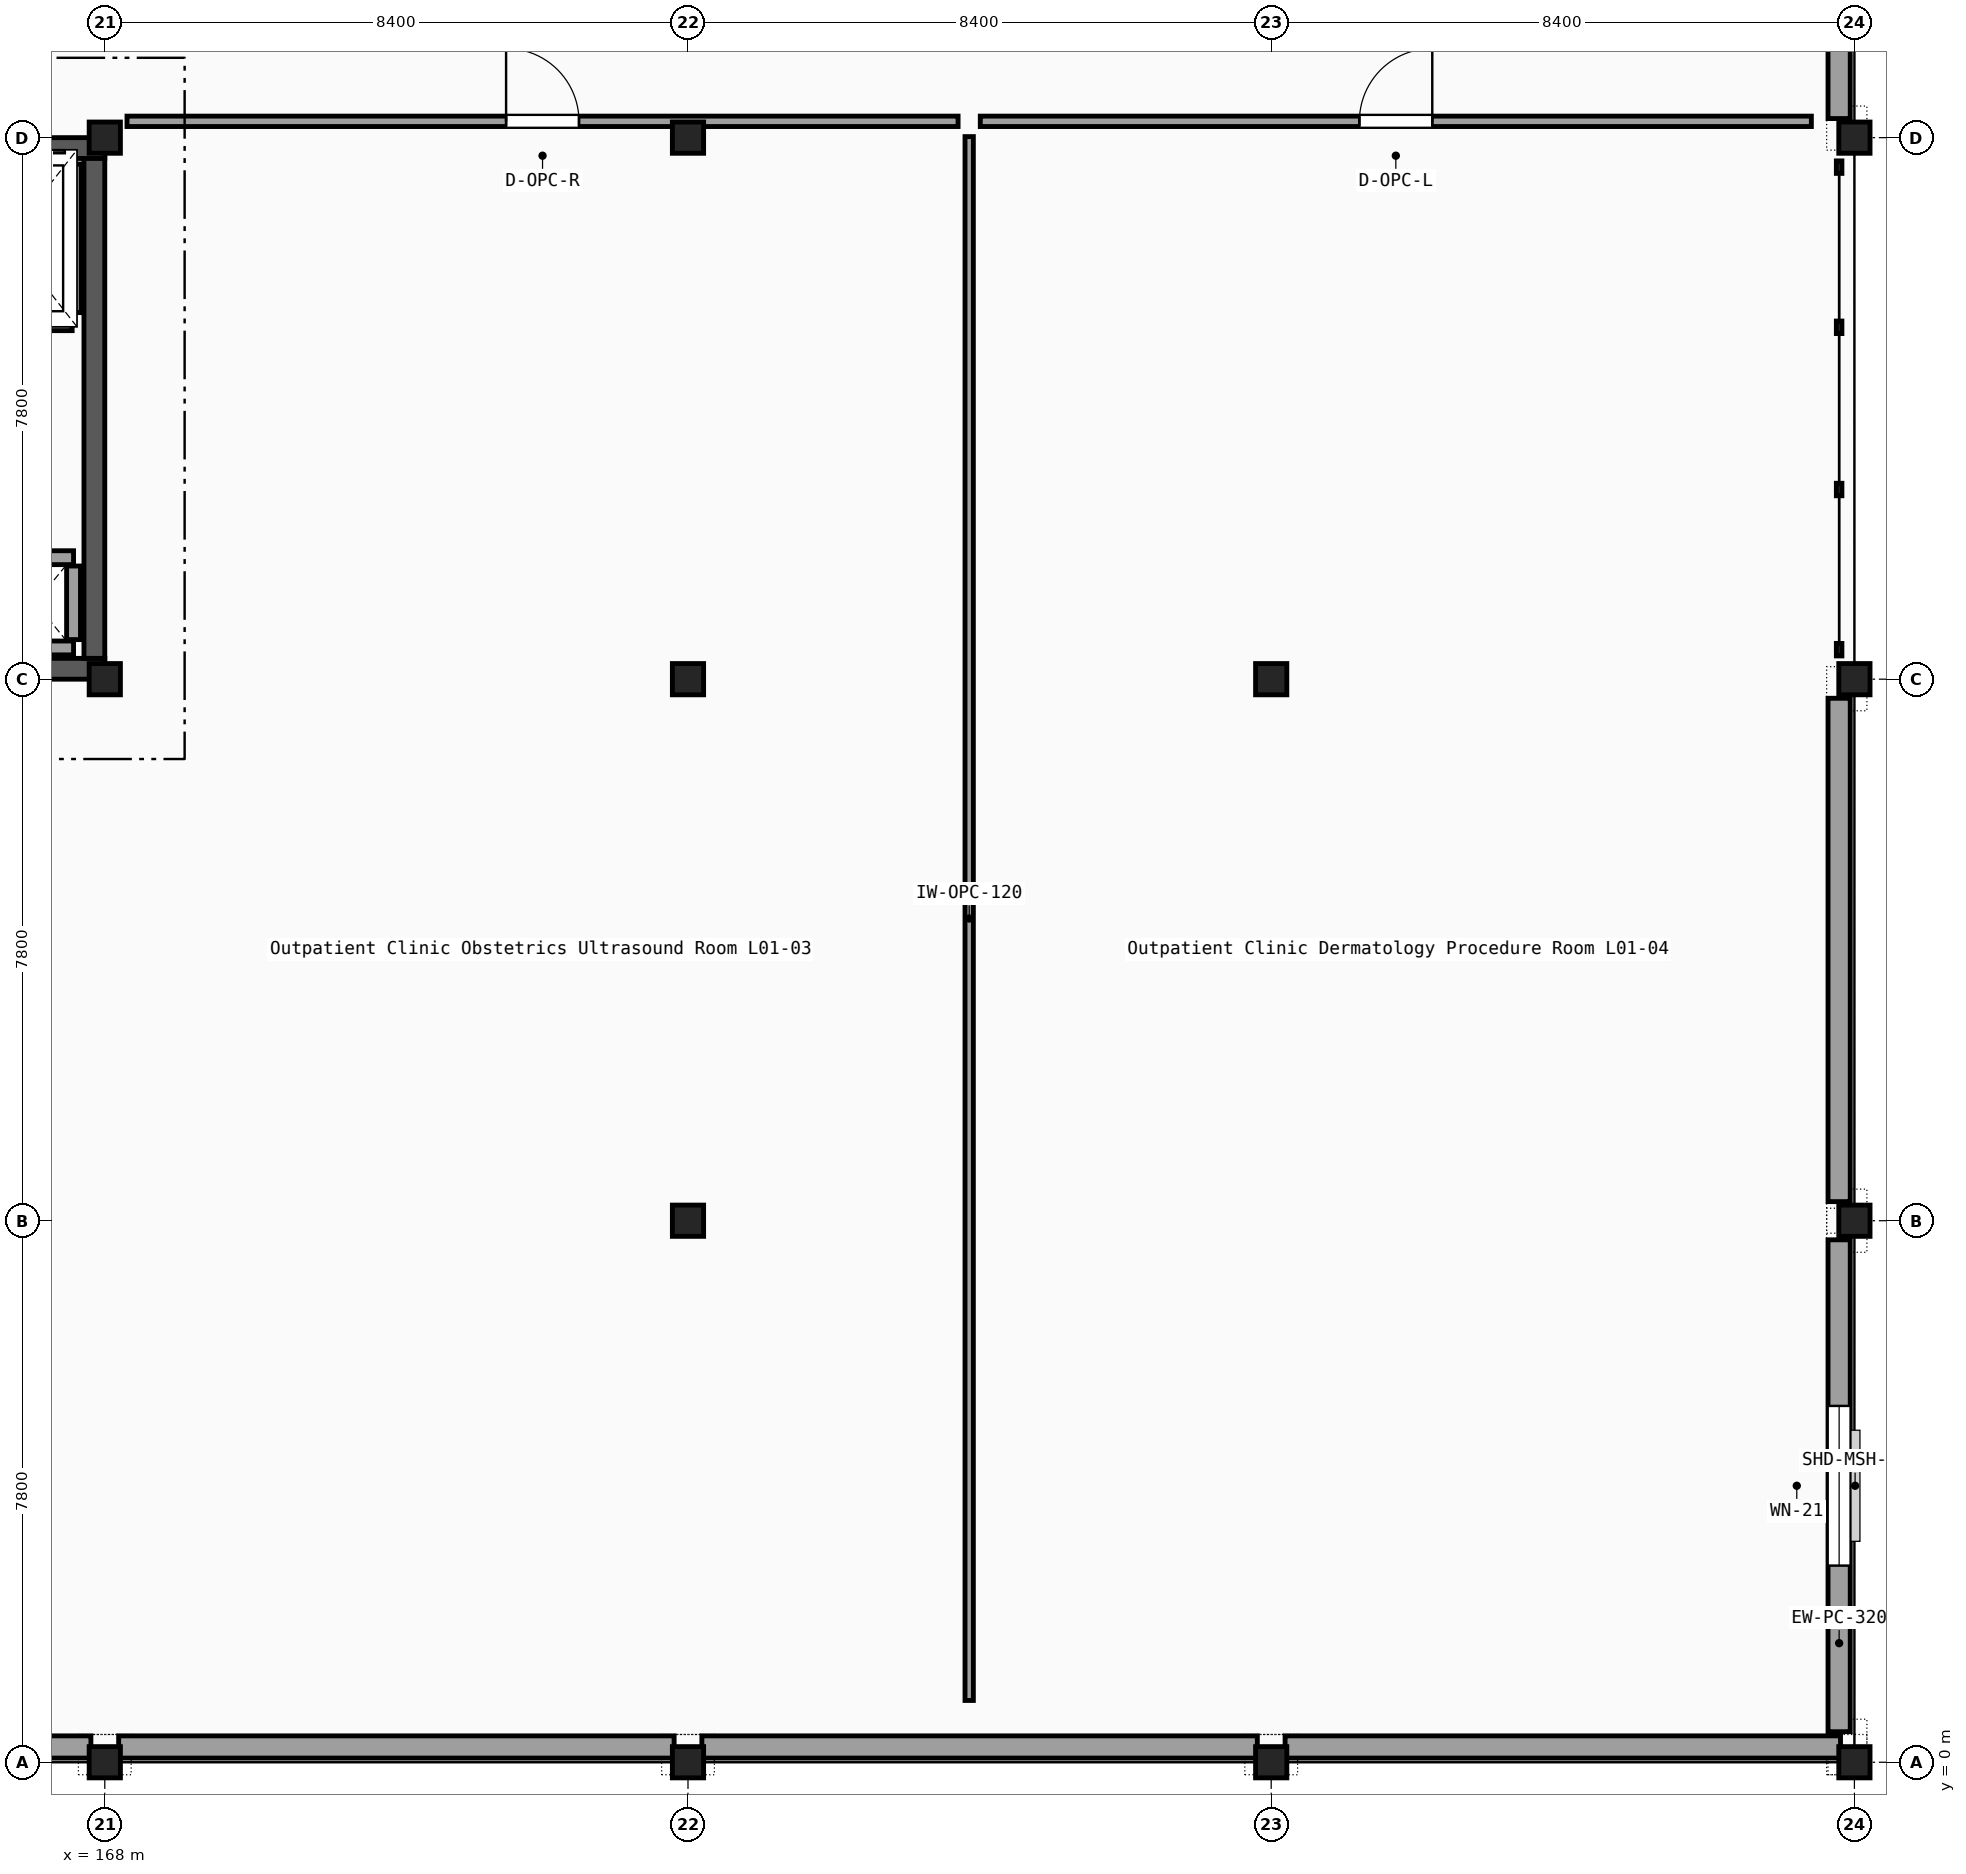
"""IFC4 building model, lengths in metres.
Left out: names, types, materials, properties, quantities, classifications, styles, units other than length and angle.
Written with IfcOpenShell. Run it as: python <this file> out.ifc"""

import sys

from ifc_helpers import new_model, si_unit, direction, frame, frame_2d, origin, origin_2d, place, context, subcontext, project, spatial, rectangle, i_section, extrude, element, fill, save


model = new_model("IFC4")
c1 = context("Model", 3, precision=1e-05, world=origin(), true_north=direction((0.0, 1.0)))
c2 = subcontext(c1, "Body", "Model", "MODEL_VIEW")
j1 = project(units=[si_unit("LENGTHUNIT", "METRE"), si_unit("PLANEANGLEUNIT", "RADIAN")], contexts=[c1])
p1 = place(None, origin())
s1 = spatial("IfcSite", under=j1, at=p1, CompositionType="ELEMENT")
p2 = place(p1, origin())
s2 = spatial("IfcBuilding", under=s1, at=p2, CompositionType="ELEMENT")
p3 = place(p2, frame((0.0, 0.0, 5.1)))
s3 = spatial("IfcBuildingStorey", under=s2, at=p3, CompositionType="ELEMENT", Elevation=5.1)
for number, where, z_axis, x_axis in (
    (1, (168.0, 0.0, 0.0), (0.0, 0.0, 1.0), (1.0, 0.0, 0.0)),
    (2, (168.0, 15.6, 0.0), (0.0, 0.0, 1.0), (1.0, 0.0, 0.0)),
    (3, (168.0, 23.4, 0.0), (0.0, 0.0, 1.0), (1.0, 0.0, 0.0)),
    (4, (176.4, 0.0, 0.0), (0.0, 0.0, 1.0), (1.0, 0.0, 0.0)),
    (5, (176.4, 7.8, 0.0), (0.0, 0.0, 1.0), (1.0, 0.0, 0.0)),
    (6, (176.4, 15.6, 0.0), (0.0, 0.0, 1.0), (1.0, 0.0, 0.0)),
    (7, (176.4, 23.4, 0.0), (0.0, 0.0, 1.0), (1.0, 0.0, 0.0)),
    (8, (184.8, 0.0, 0.0), (0.0, 0.0, 1.0), (1.0, 0.0, 0.0)),
    (9, (184.8, 15.6, 0.0), (0.0, 0.0, 1.0), (1.0, 0.0, 0.0)),
    (10, (193.2, 0.0, 0.0), (0.0, 0.0, 1.0), (1.0, 0.0, 0.0)),
    (11, (193.2, 7.8, 0.0), (0.0, 0.0, 1.0), (1.0, 0.0, 0.0)),
    (12, (193.2, 15.6, 0.0), (0.0, 0.0, 1.0), (1.0, 0.0, 0.0)),
    (13, (193.2, 23.4, 0.0), (0.0, 0.0, 1.0), (1.0, 0.0, 0.0)),
):
    element("IfcColumn", number, at=place(p3, frame(where, z_axis=z_axis, x_axis=x_axis)), inside=s3, PredefinedType="COLUMN", context=c2, shape_type="SweptSolid", body=[
        extrude(i_section(OverallWidth=0.3, OverallDepth=0.45, WebThickness=0.014, FlangeThickness=0.026, FilletRadius=0.027, at=origin_2d()), origin(), (0.0, 0.0, 1.0), 5.1),
    ])
p4 = place(p3, frame((159.8, 0.22, 0.0), z_axis=(0.0, 0.0, 1.0), x_axis=(1.0, 0.0, 0.0)))
e14 = element("IfcWall", 14, at=p4, inside=s3, PredefinedType="SOLIDWALL", context=c2, shape_type="SweptSolid", body=[
    extrude(rectangle(XDim=8.0, YDim=0.32, at=frame_2d((4.0, 0.0))), origin(), (0.0, 0.0, 1.0), 4.45),
])
p5 = place(p4, frame((3.375, 0.0, 0.95)))
e15 = element("IfcOpeningElement", 15, at=p5, cuts=e14, PredefinedType="OPENING", context=c2, shape_type="SweptSolid", body=[
    extrude(rectangle(XDim=1.25, YDim=1.5, at=frame_2d((0.625, 0.75))), frame((0.0, 0.17, 0.0), z_axis=(0.0, -1.0, 0.0), x_axis=(1.0, 0.0, 0.0)), (0.0, 0.0, 1.0), 0.34),
])
for number, where, z_axis, x_axis in (
    (16, (168.2, 0.22, 0.0), (0.0, 0.0, 1.0), (1.0, 0.0, 0.0)),
    (17, (176.6, 0.22, 0.0), (0.0, 0.0, 1.0), (1.0, 0.0, 0.0)),
    (18, (185.0, 0.22, 0.0), (0.0, 0.0, 1.0), (1.0, 0.0, 0.0)),
):
    element("IfcWall", number, at=place(p3, frame(where, z_axis=z_axis, x_axis=x_axis)), inside=s3, PredefinedType="SOLIDWALL", context=c2, shape_type="SweptSolid", body=[
        extrude(rectangle(XDim=8.0, YDim=0.32, at=frame_2d((4.0, 0.0))), origin(), (0.0, 0.0, 1.0), 4.45),
    ])
p6 = place(p3, frame((192.98, 0.44, 0.0), z_axis=(0.0, 0.0, 1.0), x_axis=(0.0, 1.0, 0.0)))
e19 = element("IfcWall", 19, at=p6, inside=s3, PredefinedType="SOLIDWALL", context=c2, shape_type="SweptSolid", body=[
    extrude(rectangle(XDim=7.085, YDim=0.32, at=frame_2d((3.542, 0.0))), origin(), (0.0, 0.0, 1.0), 4.35),
])
p7 = place(p6, frame((2.393, 0.0, 0.95)))
e20 = element("IfcOpeningElement", 20, at=p7, cuts=e19, PredefinedType="OPENING", context=c2, shape_type="SweptSolid", body=[
    extrude(rectangle(XDim=2.3, YDim=1.55, at=frame_2d((1.15, 0.775))), frame((0.0, 0.17, 0.0), z_axis=(0.0, -1.0, 0.0), x_axis=(1.0, 0.0, 0.0)), (0.0, 0.0, 1.0), 0.34),
])
for number, where, z_axis, x_axis in (
    (21, (192.98, 8.075, 0.0), (0.0, 0.0, 1.0), (0.0, 1.0, 0.0)),
    (22, (192.98, 23.675, 0.0), (0.0, 0.0, 1.0), (0.0, 1.0, 0.0)),
):
    element("IfcWall", number, at=place(p3, frame(where, z_axis=z_axis, x_axis=x_axis)), inside=s3, PredefinedType="SOLIDWALL", context=c2, shape_type="SweptSolid", body=[
        extrude(rectangle(XDim=7.25, YDim=0.32, at=frame_2d((3.625, 0.0))), origin(), (0.0, 0.0, 1.0), 4.35),
    ])
p8 = place(p3, frame((159.6, 15.75, 0.0), z_axis=(0.0, 0.0, 1.0), x_axis=(1.0, 0.0, 0.0)))
e23 = element("IfcWall", 23, at=p8, inside=s3, PredefinedType="SHEAR", context=c2, shape_type="SweptSolid", body=[
    extrude(rectangle(XDim=8.4, YDim=0.3, at=frame_2d((4.2, 0.0))), origin(), (0.0, 0.0, 1.0), 4.87),
])
p9 = place(p3, frame((159.6, 23.25, 0.0), z_axis=(0.0, 0.0, 1.0), x_axis=(1.0, 0.0, 0.0)))
e24 = element("IfcWall", 24, at=p9, inside=s3, PredefinedType="SHEAR", context=c2, shape_type="SweptSolid", body=[
    extrude(rectangle(XDim=8.4, YDim=0.3, at=frame_2d((4.2, 0.0))), origin(), (0.0, 0.0, 1.0), 4.87),
])
p10 = place(p9, frame((1.38, 0.0, 0.0)))
e25 = element("IfcOpeningElement", 25, at=p10, cuts=e24, PredefinedType="OPENING", context=c2, shape_type="SweptSolid", body=[
    extrude(rectangle(XDim=1.2, YDim=2.15, at=frame_2d((0.6, 1.075))), frame((0.0, 0.16, 0.0), z_axis=(0.0, -1.0, 0.0), x_axis=(1.0, 0.0, 0.0)), (0.0, 0.0, 1.0), 0.32),
])
p11 = place(p9, frame((4.43, 0.0, 0.0)))
e26 = element("IfcOpeningElement", 26, at=p11, cuts=e24, PredefinedType="OPENING", context=c2, shape_type="SweptSolid", body=[
    extrude(rectangle(XDim=1.1, YDim=2.15, at=frame_2d((0.55, 1.075))), frame((0.0, 0.16, 0.0), z_axis=(0.0, -1.0, 0.0), x_axis=(1.0, 0.0, 0.0)), (0.0, 0.0, 1.0), 0.32),
])
p12 = place(p9, frame((6.45, 0.0, 0.0)))
e27 = element("IfcOpeningElement", 27, at=p12, cuts=e24, PredefinedType="OPENING", context=c2, shape_type="SweptSolid", body=[
    extrude(rectangle(XDim=1.1, YDim=2.15, at=frame_2d((0.55, 1.075))), frame((0.0, 0.16, 0.0), z_axis=(0.0, -1.0, 0.0), x_axis=(1.0, 0.0, 0.0)), (0.0, 0.0, 1.0), 0.32),
])
p13 = place(p3, frame((167.85, 15.9, 0.0), z_axis=(0.0, 0.0, 1.0), x_axis=(0.0, 1.0, 0.0)))
e28 = element("IfcWall", 28, at=p13, inside=s3, PredefinedType="SHEAR", context=c2, shape_type="SweptSolid", body=[
    extrude(rectangle(XDim=7.2, YDim=0.3, at=frame_2d((3.6, 0.0))), origin(), (0.0, 0.0, 1.0), 4.87),
])
for number, where, z_axis, x_axis in (
    (29, (166.45, 16.05, 0.0), (0.0, 0.0, 1.0), (1.0, 0.0, 0.0)),
    (30, (166.45, 17.35, 0.0), (0.0, 0.0, 1.0), (1.0, 0.0, 0.0)),
):
    element("IfcWall", number, at=place(p3, frame(where, z_axis=z_axis, x_axis=x_axis)), inside=s3, PredefinedType="PARTITIONING", context=c2, shape_type="SweptSolid", body=[
        extrude(rectangle(XDim=1.1, YDim=0.2, at=frame_2d((0.55, 0.0))), origin(), (0.0, 0.0, 1.0), 4.25),
    ])
p14 = place(p3, frame((167.55, 16.17, 0.0), z_axis=(0.0, 0.0, 1.0), x_axis=(0.0, 1.0, 0.0)))
e31 = element("IfcWall", 31, at=p14, inside=s3, PredefinedType="PARTITIONING", context=c2, shape_type="SweptSolid", body=[
    extrude(rectangle(XDim=1.06, YDim=0.2, at=frame_2d((0.53, 0.0))), origin(), (0.0, 0.0, 1.0), 4.25),
])
p15 = place(p3, frame((167.56, 20.88, 0.0), z_axis=(0.0, 0.0, 1.0), x_axis=(0.0, 1.0, 0.0)))
e32 = element("IfcWall", 32, at=p15, inside=s3, PredefinedType="PARTITIONING", context=c2, shape_type="SweptSolid", body=[
    extrude(rectangle(XDim=2.14, YDim=0.2, at=frame_2d((1.07, 0.0))), origin(), (0.0, 0.0, 1.0), 4.25),
])
p16 = place(p3, frame((165.67, 20.72, 0.0), z_axis=(0.0, 0.0, 1.0), x_axis=(1.0, 0.0, 0.0)))
e33 = element("IfcWall", 33, at=p16, inside=s3, PredefinedType="PARTITIONING", context=c2, shape_type="SweptSolid", body=[
    extrude(rectangle(XDim=1.86, YDim=0.2, at=frame_2d((0.93, 0.0))), origin(), (0.0, 0.0, 1.0), 4.25),
])
p17 = place(p3, frame((168.32, 23.635, 0.0), z_axis=(0.0, 0.0, 1.0), x_axis=(1.0, 0.0, 0.0)))
e34 = element("IfcWall", 34, at=p17, inside=s3, PredefinedType="PARTITIONING", context=c2, shape_type="SweptSolid", body=[
    extrude(rectangle(XDim=11.97, YDim=0.15, at=frame_2d((5.985, 0.0))), origin(), (0.0, 0.0, 1.0), 4.35),
])
p18 = place(p17, frame((5.46, 0.0, 0.0)))
e35 = element("IfcOpeningElement", 35, at=p18, cuts=e34, PredefinedType="OPENING", context=c2, shape_type="SweptSolid", body=[
    extrude(rectangle(XDim=1.05, YDim=2.15, at=frame_2d((0.525, 1.075))), frame((0.0, 0.085, 0.0), z_axis=(0.0, -1.0, 0.0), x_axis=(1.0, 0.0, 0.0)), (0.0, 0.0, 1.0), 0.17),
])
p19 = place(p3, frame((180.45, 0.89, 0.0), z_axis=(0.0, 0.0, 1.0), x_axis=(0.0, 1.0, 0.0)))
e36 = element("IfcWall", 36, at=p19, inside=s3, PredefinedType="PARTITIONING", context=c2, shape_type="SweptSolid", body=[
    extrude(rectangle(XDim=22.525, YDim=0.12, at=frame_2d((11.263, 0.0))), origin(), (0.0, 0.0, 1.0), 4.35),
])
p20 = place(p3, frame((180.61, 23.635, 0.0), z_axis=(0.0, 0.0, 1.0), x_axis=(1.0, 0.0, 0.0)))
e37 = element("IfcWall", 37, at=p20, inside=s3, PredefinedType="PARTITIONING", context=c2, shape_type="SweptSolid", body=[
    extrude(rectangle(XDim=11.97, YDim=0.15, at=frame_2d((5.985, 0.0))), origin(), (0.0, 0.0, 1.0), 4.35),
])
p21 = place(p20, frame((5.46, 0.0, 0.0)))
e38 = element("IfcOpeningElement", 38, at=p21, cuts=e37, PredefinedType="OPENING", context=c2, shape_type="SweptSolid", body=[
    extrude(rectangle(XDim=1.05, YDim=2.15, at=frame_2d((0.525, 1.075))), frame((0.0, 0.085, 0.0), z_axis=(0.0, -1.0, 0.0), x_axis=(1.0, 0.0, 0.0)), (0.0, 0.0, 1.0), 0.17),
])
p22 = place(p7, origin())
e39 = element("IfcWindow", 39, at=p22, inside=s3, PartitioningType="SINGLE_PANEL", PredefinedType="WINDOW", context=c2, shape_type="SweptSolid", body=[
    extrude(rectangle(XDim=2.3, YDim=1.55, at=frame_2d((1.15, 0.775))), frame((0.0, 0.03, 0.0), z_axis=(0.0, -1.0, 0.0), x_axis=(1.0, 0.0, 0.0)), (0.0, 0.0, 1.0), 0.06),
])
fill(e20, e39)
p23 = place(p18, origin())
e40 = element("IfcDoor", 40, at=p23, inside=s3, OperationType="SINGLE_SWING_LEFT", PredefinedType="DOOR", context=c2, shape_type="SweptSolid", body=[
    extrude(rectangle(XDim=1.05, YDim=2.15, at=frame_2d((0.525, 1.075))), frame((0.0, 0.025, 0.0), z_axis=(0.0, -1.0, 0.0), x_axis=(1.0, 0.0, 0.0)), (0.0, 0.0, 1.0), 0.05),
])
fill(e35, e40)
p24 = place(p21, origin())
e41 = element("IfcDoor", 41, at=p24, inside=s3, OperationType="SINGLE_SWING_RIGHT", PredefinedType="DOOR", context=c2, shape_type="SweptSolid", body=[
    extrude(rectangle(XDim=1.05, YDim=2.15, at=frame_2d((0.525, 1.075))), frame((0.0, 0.025, 0.0), z_axis=(0.0, -1.0, 0.0), x_axis=(1.0, 0.0, 0.0)), (0.0, 0.0, 1.0), 0.05),
])
fill(e38, e41)
save(model, sys.argv[1])
